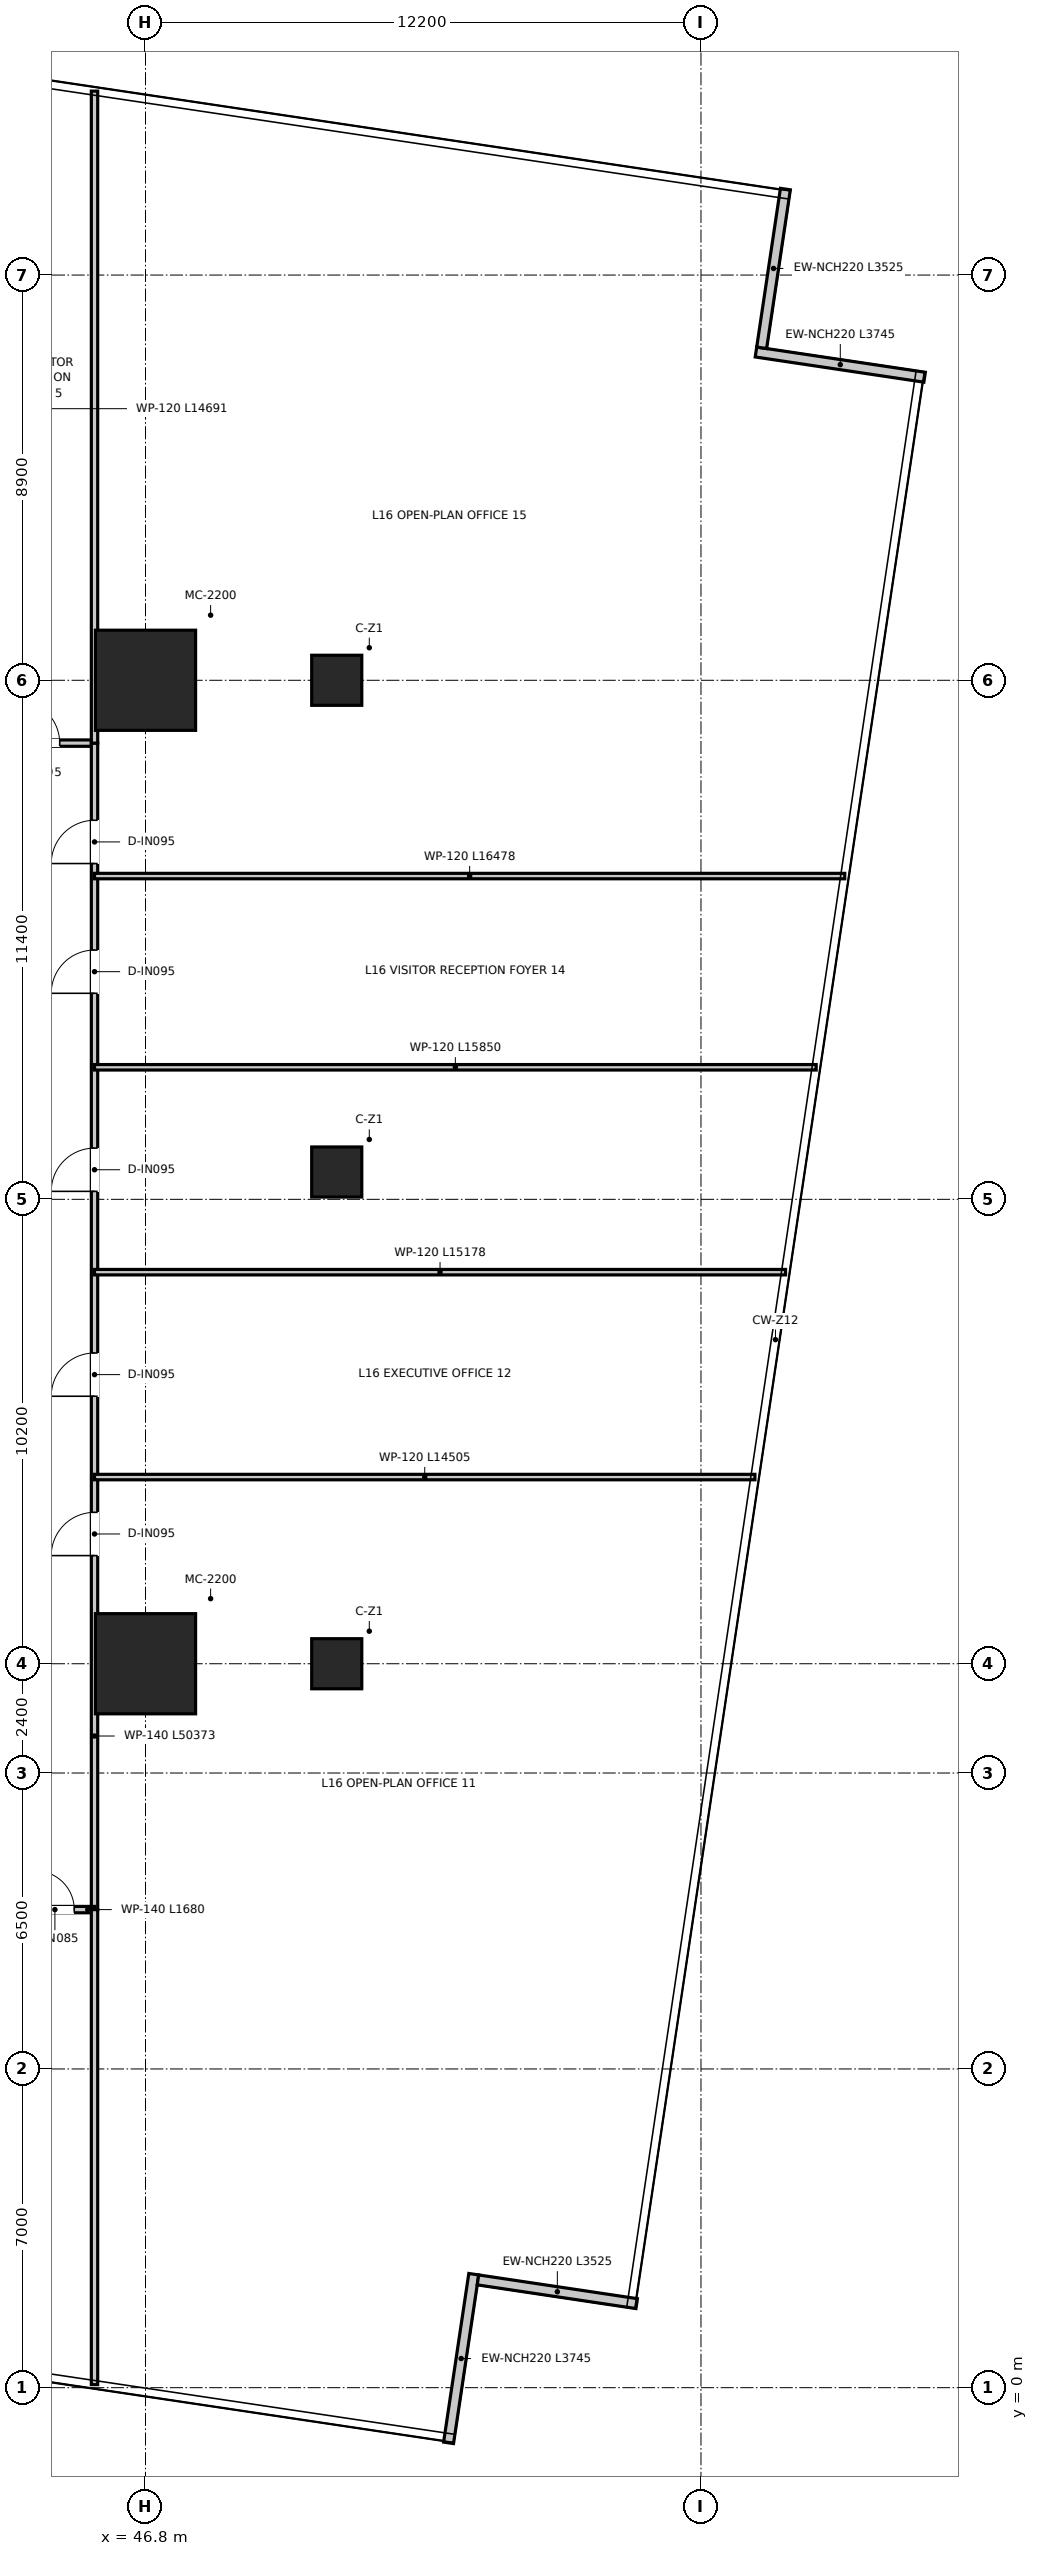
"""IFC4 building model, lengths in metres.
Left out: names, types, materials, properties, quantities, classifications, styles, units other than length and angle.
Written with IfcOpenShell. Run it as: python <this file> out.ifc"""

import sys

from ifc_helpers import new_model, si_unit, direction, frame, frame_2d, origin, origin_2d, place, context, subcontext, project, spatial, rectangle, extrude, source, transform, mapped, element, fill, save


model = new_model("IFC4")
c1 = context("Model", 3, precision=1e-05, world=origin(), true_north=direction((0.0, 1.0)))
c2 = subcontext(c1, "Body", "Model", "MODEL_VIEW")
j1 = project(units=[si_unit("LENGTHUNIT", "METRE"), si_unit("PLANEANGLEUNIT", "RADIAN")], contexts=[c1])
p1 = place(None, origin())
s1 = spatial("IfcSite", under=j1, at=p1, CompositionType="ELEMENT")
p2 = place(p1, origin())
s2 = spatial("IfcBuilding", under=s1, at=p2, CompositionType="ELEMENT")
p3 = place(p2, frame((0.0, 0.0, 68.45)))
s3 = spatial("IfcBuildingStorey", under=s2, at=p3, CompositionType="ELEMENT", Elevation=68.45)
m1 = source(origin(), c2, "Body", "SweptSolid", [
    extrude(rectangle(XDim=2.2, YDim=2.2, at=origin_2d()), origin(), (0.0, 0.0, 1.0), 3.95),
])
for number, where, z_axis, x_axis in (
    (1, (46.8, 15.9, 0.0), (0.0, 0.0, 1.0), (1.0, 0.0, 0.0)),
    (2, (46.8, 37.5, 0.0), (0.0, 0.0, 1.0), (1.0, 0.0, 0.0)),
):
    element("IfcColumn", number, at=place(p3, frame(where, z_axis=z_axis, x_axis=x_axis)), inside=s3, PredefinedType="USERDEFINED", context=c2, shape_type="MappedRepresentation", body=[
        mapped(m1, transform((0.0, 0.0, 0.0), x_axis=(1.0, 0.0, 0.0), y_axis=(0.0, 1.0, 0.0), z_axis=(0.0, 0.0, 1.0), scale=1.0)),
    ])
m2 = source(origin(), c2, "Body", "SweptSolid", [
    extrude(rectangle(XDim=1.1, YDim=1.1, at=origin_2d()), origin(), (0.0, 0.0, 1.0), 3.95),
])
for number, where, z_axis, x_axis in (
    (3, (51.0, 37.5, 0.0), (0.0, 0.0, 1.0), (1.0, 0.0, 0.0)),
    (4, (51.0, 26.7, 0.0), (0.0, 0.0, 1.0), (1.0, 0.0, 0.0)),
    (5, (51.0, 15.9, 0.0), (0.0, 0.0, 1.0), (1.0, 0.0, 0.0)),
):
    element("IfcColumn", number, at=place(p3, frame(where, z_axis=z_axis, x_axis=x_axis)), inside=s3, PredefinedType="COLUMN", context=c2, shape_type="MappedRepresentation", body=[
        mapped(m2, transform((0.0, 0.0, 0.0), x_axis=(1.0, 0.0, 0.0), y_axis=(0.0, 1.0, 0.0), z_axis=(0.0, 0.0, 1.0), scale=1.0)),
    ])
p4 = place(p3, frame((53.456, -1.212, 0.0), z_axis=(0.0, 0.0, 1.0), x_axis=(0.147852699435, 0.989009392913, 0.0)))
e6 = element("IfcWall", 6, at=p4, inside=s3, PredefinedType="ELEMENTEDWALL", context=c2, shape_type="SweptSolid", body=[
    extrude(rectangle(XDim=3.745, YDim=0.22, at=frame_2d((1.873, 0.0))), origin(), (0.0, 0.0, 1.0), 3.67),
])
p5 = place(p3, frame((54.102, 2.367, 0.0), z_axis=(0.0, 0.0, 1.0), x_axis=(0.989015973204, -0.147808676155, 0.0)))
e7 = element("IfcWall", 7, at=p5, inside=s3, PredefinedType="ELEMENTEDWALL", context=c2, shape_type="SweptSolid", body=[
    extrude(rectangle(XDim=3.525, YDim=0.22, at=frame_2d((1.762, 0.0))), origin(), (0.0, 0.0, 1.0), 3.67),
])
p6 = place(p3, frame((63.912, 44.156, 0.0), z_axis=(0.0, 0.0, 1.0), x_axis=(-0.989009392913, 0.147852699435, 0.0)))
e8 = element("IfcWall", 8, at=p6, inside=s3, PredefinedType="ELEMENTEDWALL", context=c2, shape_type="SweptSolid", body=[
    extrude(rectangle(XDim=3.745, YDim=0.22, at=frame_2d((1.873, 0.0))), origin(), (0.0, 0.0, 1.0), 3.67),
])
p7 = place(p3, frame((60.333, 44.802, 0.0), z_axis=(0.0, 0.0, 1.0), x_axis=(0.147798551521, 0.98901748628, 0.0)))
e9 = element("IfcWall", 9, at=p7, inside=s3, PredefinedType="ELEMENTEDWALL", context=c2, shape_type="SweptSolid", body=[
    extrude(rectangle(XDim=3.525, YDim=0.22, at=frame_2d((1.763, 0.0))), origin(), (0.0, 0.0, 1.0), 3.67),
])
p8 = place(p3, frame((26.32, 36.12, 0.0), z_axis=(0.0, 0.0, 1.0), x_axis=(1.0, 0.0, 0.0)))
e10 = element("IfcWall", 10, at=p8, inside=s3, PredefinedType="PARTITIONING", context=c2, shape_type="SweptSolid", body=[
    extrude(rectangle(XDim=19.36, YDim=0.14, at=frame_2d((9.68, 0.0))), origin(), (0.0, 0.0, 1.0), 3.08),
])
p9 = place(p8, frame((1.265, 0.0, 0.0)))
e11 = element("IfcOpeningElement", 11, at=p9, cuts=e10, PredefinedType="OPENING", context=c2, shape_type="SweptSolid", body=[
    extrude(rectangle(XDim=0.95, YDim=2.1, at=frame_2d((0.475, 1.05))), frame((0.0, 0.08, 0.0), z_axis=(0.0, -1.0, 0.0), x_axis=(1.0, 0.0, 0.0)), (0.0, 0.0, 1.0), 0.16),
])
p10 = place(p8, frame((5.305, 0.0, 0.0)))
e12 = element("IfcOpeningElement", 12, at=p10, cuts=e10, PredefinedType="OPENING", context=c2, shape_type="SweptSolid", body=[
    extrude(rectangle(XDim=0.95, YDim=2.1, at=frame_2d((0.475, 1.05))), frame((0.0, 0.08, 0.0), z_axis=(0.0, -1.0, 0.0), x_axis=(1.0, 0.0, 0.0)), (0.0, 0.0, 1.0), 0.16),
])
p11 = place(p8, frame((9.905, 0.0, 0.0)))
e13 = element("IfcOpeningElement", 13, at=p11, cuts=e10, PredefinedType="OPENING", context=c2, shape_type="SweptSolid", body=[
    extrude(rectangle(XDim=0.95, YDim=2.1, at=frame_2d((0.475, 1.05))), frame((0.0, 0.08, 0.0), z_axis=(0.0, -1.0, 0.0), x_axis=(1.0, 0.0, 0.0)), (0.0, 0.0, 1.0), 0.16),
])
p12 = place(p8, frame((14.305, 0.0, 0.0)))
e14 = element("IfcOpeningElement", 14, at=p12, cuts=e10, PredefinedType="OPENING", context=c2, shape_type="SweptSolid", body=[
    extrude(rectangle(XDim=0.95, YDim=2.1, at=frame_2d((0.475, 1.05))), frame((0.0, 0.08, 0.0), z_axis=(0.0, -1.0, 0.0), x_axis=(1.0, 0.0, 0.0)), (0.0, 0.0, 1.0), 0.16),
])
p13 = place(p8, frame((17.645, 0.0, 0.0)))
e15 = element("IfcOpeningElement", 15, at=p13, cuts=e10, PredefinedType="OPENING", context=c2, shape_type="SweptSolid", body=[
    extrude(rectangle(XDim=0.95, YDim=2.1, at=frame_2d((0.475, 1.05))), frame((0.0, 0.08, 0.0), z_axis=(0.0, -1.0, 0.0), x_axis=(1.0, 0.0, 0.0)), (0.0, 0.0, 1.0), 0.16),
])
p14 = place(p3, frame((45.68, 10.5, 0.0), z_axis=(0.0, 0.0, 1.0), x_axis=(0.0, 1.0, 0.0)))
e16 = element("IfcWall", 16, at=p14, inside=s3, PredefinedType="PARTITIONING", context=c2, shape_type="SweptSolid", body=[
    extrude(rectangle(XDim=25.62, YDim=0.14, at=frame_2d((12.81, 0.0))), origin(), (0.0, 0.0, 1.0), 2.97),
])
p15 = place(p14, frame((7.775, 0.0, 0.0)))
e17 = element("IfcOpeningElement", 17, at=p15, cuts=e16, PredefinedType="OPENING", context=c2, shape_type="SweptSolid", body=[
    extrude(rectangle(XDim=0.95, YDim=2.1, at=frame_2d((0.475, 1.05))), frame((0.0, 0.08, 0.0), z_axis=(0.0, -1.0, 0.0), x_axis=(1.0, 0.0, 0.0)), (0.0, 0.0, 1.0), 0.16),
])
p16 = place(p14, frame((11.275, 0.0, 0.0)))
e18 = element("IfcOpeningElement", 18, at=p16, cuts=e16, PredefinedType="OPENING", context=c2, shape_type="SweptSolid", body=[
    extrude(rectangle(XDim=0.95, YDim=2.1, at=frame_2d((0.475, 1.05))), frame((0.0, 0.08, 0.0), z_axis=(0.0, -1.0, 0.0), x_axis=(1.0, 0.0, 0.0)), (0.0, 0.0, 1.0), 0.16),
])
p17 = place(p14, frame((15.775, 0.0, 0.0)))
e19 = element("IfcOpeningElement", 19, at=p17, cuts=e16, PredefinedType="OPENING", context=c2, shape_type="SweptSolid", body=[
    extrude(rectangle(XDim=0.95, YDim=2.1, at=frame_2d((0.475, 1.05))), frame((0.0, 0.08, 0.0), z_axis=(0.0, -1.0, 0.0), x_axis=(1.0, 0.0, 0.0)), (0.0, 0.0, 1.0), 0.16),
])
p18 = place(p14, frame((20.125, 0.0, 0.0)))
e20 = element("IfcOpeningElement", 20, at=p18, cuts=e16, PredefinedType="OPENING", context=c2, shape_type="SweptSolid", body=[
    extrude(rectangle(XDim=0.95, YDim=2.1, at=frame_2d((0.475, 1.05))), frame((0.0, 0.08, 0.0), z_axis=(0.0, -1.0, 0.0), x_axis=(1.0, 0.0, 0.0)), (0.0, 0.0, 1.0), 0.16),
])
p19 = place(p14, frame((22.975, 0.0, 0.0)))
e21 = element("IfcOpeningElement", 21, at=p19, cuts=e16, PredefinedType="OPENING", context=c2, shape_type="SweptSolid", body=[
    extrude(rectangle(XDim=0.95, YDim=2.1, at=frame_2d((0.475, 1.05))), frame((0.0, 0.08, 0.0), z_axis=(0.0, -1.0, 0.0), x_axis=(1.0, 0.0, 0.0)), (0.0, 0.0, 1.0), 0.16),
])
p20 = place(p3, frame((44.0, 10.5, 0.0), z_axis=(0.0, 0.0, 1.0), x_axis=(1.0, 0.0, 0.0)))
e22 = element("IfcWall", 22, at=p20, inside=s3, PredefinedType="PARTITIONING", context=c2, shape_type="SweptSolid", body=[
    extrude(rectangle(XDim=1.68, YDim=0.14, at=frame_2d((0.84, 0.0))), origin(), (0.0, 0.0, 1.0), 3.67),
])
p21 = place(p20, frame((0.385, 0.0, 0.0)))
e23 = element("IfcOpeningElement", 23, at=p21, cuts=e22, PredefinedType="OPENING", context=c2, shape_type="SweptSolid", body=[
    extrude(rectangle(XDim=0.85, YDim=2.1, at=frame_2d((0.425, 1.05))), frame((0.0, 0.08, 0.0), z_axis=(0.0, -1.0, 0.0), x_axis=(1.0, 0.0, 0.0)), (0.0, 0.0, 1.0), 0.16),
])
p22 = place(p3, frame((45.68, 36.12, 0.0), z_axis=(0.0, 0.0, 1.0), x_axis=(0.0, 1.0, 0.0)))
e24 = element("IfcWall", 24, at=p22, inside=s3, PredefinedType="PARTITIONING", context=c2, shape_type="SweptSolid", body=[
    extrude(rectangle(XDim=14.32, YDim=0.14, at=frame_2d((7.16, 0.0))), origin(), (0.0, 0.0, 1.0), 2.97),
])
p23 = place(p3, frame((45.68, 0.067, 0.0), z_axis=(0.0, 0.0, 1.0), x_axis=(0.0, 1.0, 0.0)))
e25 = element("IfcWall", 25, at=p23, inside=s3, PredefinedType="PARTITIONING", context=c2, shape_type="SweptSolid", body=[
    extrude(rectangle(XDim=10.433, YDim=0.14, at=frame_2d((5.217, 0.0))), origin(), (0.0, 0.0, 1.0), 3.67),
])
p24 = place(p3, frame((45.68, 20.0, 0.0), z_axis=(0.0, 0.0, 1.0), x_axis=(1.0, 0.0, 0.0)))
e26 = element("IfcWall", 26, at=p24, inside=s3, PredefinedType="PARTITIONING", context=c2, shape_type="SweptSolid", body=[
    extrude(rectangle(XDim=14.505, YDim=0.12, at=frame_2d((7.253, 0.0))), origin(), (0.0, 0.0, 1.0), 2.97),
])
p25 = place(p3, frame((45.68, 24.5, 0.0), z_axis=(0.0, 0.0, 1.0), x_axis=(1.0, 0.0, 0.0)))
e27 = element("IfcWall", 27, at=p25, inside=s3, PredefinedType="PARTITIONING", context=c2, shape_type="SweptSolid", body=[
    extrude(rectangle(XDim=15.178, YDim=0.12, at=frame_2d((7.589, 0.0))), origin(), (0.0, 0.0, 1.0), 2.97),
])
p26 = place(p3, frame((45.68, 29.0, 0.0), z_axis=(0.0, 0.0, 1.0), x_axis=(1.0, 0.0, 0.0)))
e28 = element("IfcWall", 28, at=p26, inside=s3, PredefinedType="PARTITIONING", context=c2, shape_type="SweptSolid", body=[
    extrude(rectangle(XDim=15.851, YDim=0.12, at=frame_2d((7.925, 0.0))), origin(), (0.0, 0.0, 1.0), 2.97),
])
p27 = place(p3, frame((45.68, 33.2, 0.0), z_axis=(0.0, 0.0, 1.0), x_axis=(1.0, 0.0, 0.0)))
e29 = element("IfcWall", 29, at=p27, inside=s3, PredefinedType="PARTITIONING", context=c2, shape_type="SweptSolid", body=[
    extrude(rectangle(XDim=16.478, YDim=0.12, at=frame_2d((8.239, 0.0))), origin(), (0.0, 0.0, 1.0), 2.97),
])
p28 = place(p13, origin())
e30 = element("IfcDoor", 30, at=p28, inside=s3, OperationType="SINGLE_SWING_LEFT", PredefinedType="DOOR", context=c2, shape_type="SweptSolid", body=[
    extrude(rectangle(XDim=0.95, YDim=2.1, at=frame_2d((0.475, 1.05))), frame((0.0, 0.025, 0.0), z_axis=(0.0, -1.0, 0.0), x_axis=(1.0, 0.0, 0.0)), (0.0, 0.0, 1.0), 0.05),
])
fill(e15, e30)
p29 = place(p15, origin())
e31 = element("IfcDoor", 31, at=p29, inside=s3, OperationType="SINGLE_SWING_LEFT", PredefinedType="DOOR", context=c2, shape_type="SweptSolid", body=[
    extrude(rectangle(XDim=0.95, YDim=2.1, at=frame_2d((0.475, 1.05))), frame((0.0, 0.025, 0.0), z_axis=(0.0, -1.0, 0.0), x_axis=(1.0, 0.0, 0.0)), (0.0, 0.0, 1.0), 0.05),
])
fill(e17, e31)
p30 = place(p16, origin())
e32 = element("IfcDoor", 32, at=p30, inside=s3, OperationType="SINGLE_SWING_LEFT", PredefinedType="DOOR", context=c2, shape_type="SweptSolid", body=[
    extrude(rectangle(XDim=0.95, YDim=2.1, at=frame_2d((0.475, 1.05))), frame((0.0, 0.025, 0.0), z_axis=(0.0, -1.0, 0.0), x_axis=(1.0, 0.0, 0.0)), (0.0, 0.0, 1.0), 0.05),
])
fill(e18, e32)
p31 = place(p17, origin())
e33 = element("IfcDoor", 33, at=p31, inside=s3, OperationType="SINGLE_SWING_LEFT", PredefinedType="DOOR", context=c2, shape_type="SweptSolid", body=[
    extrude(rectangle(XDim=0.95, YDim=2.1, at=frame_2d((0.475, 1.05))), frame((0.0, 0.025, 0.0), z_axis=(0.0, -1.0, 0.0), x_axis=(1.0, 0.0, 0.0)), (0.0, 0.0, 1.0), 0.05),
])
fill(e19, e33)
p32 = place(p18, origin())
e34 = element("IfcDoor", 34, at=p32, inside=s3, OperationType="SINGLE_SWING_LEFT", PredefinedType="DOOR", context=c2, shape_type="SweptSolid", body=[
    extrude(rectangle(XDim=0.95, YDim=2.1, at=frame_2d((0.475, 1.05))), frame((0.0, 0.025, 0.0), z_axis=(0.0, -1.0, 0.0), x_axis=(1.0, 0.0, 0.0)), (0.0, 0.0, 1.0), 0.05),
])
fill(e20, e34)
p33 = place(p19, origin())
e35 = element("IfcDoor", 35, at=p33, inside=s3, OperationType="SINGLE_SWING_LEFT", PredefinedType="DOOR", context=c2, shape_type="SweptSolid", body=[
    extrude(rectangle(XDim=0.95, YDim=2.1, at=frame_2d((0.475, 1.05))), frame((0.0, 0.025, 0.0), z_axis=(0.0, -1.0, 0.0), x_axis=(1.0, 0.0, 0.0)), (0.0, 0.0, 1.0), 0.05),
])
fill(e21, e35)
p34 = place(p21, origin())
e36 = element("IfcDoor", 36, at=p34, inside=s3, OperationType="SINGLE_SWING_LEFT", PredefinedType="DOOR", context=c2, shape_type="SweptSolid", body=[
    extrude(rectangle(XDim=0.85, YDim=2.1, at=frame_2d((0.425, 1.05))), frame((0.0, 0.025, 0.0), z_axis=(0.0, -1.0, 0.0), x_axis=(1.0, 0.0, 0.0)), (0.0, 0.0, 1.0), 0.05),
])
fill(e23, e36)
save(model, sys.argv[1])
